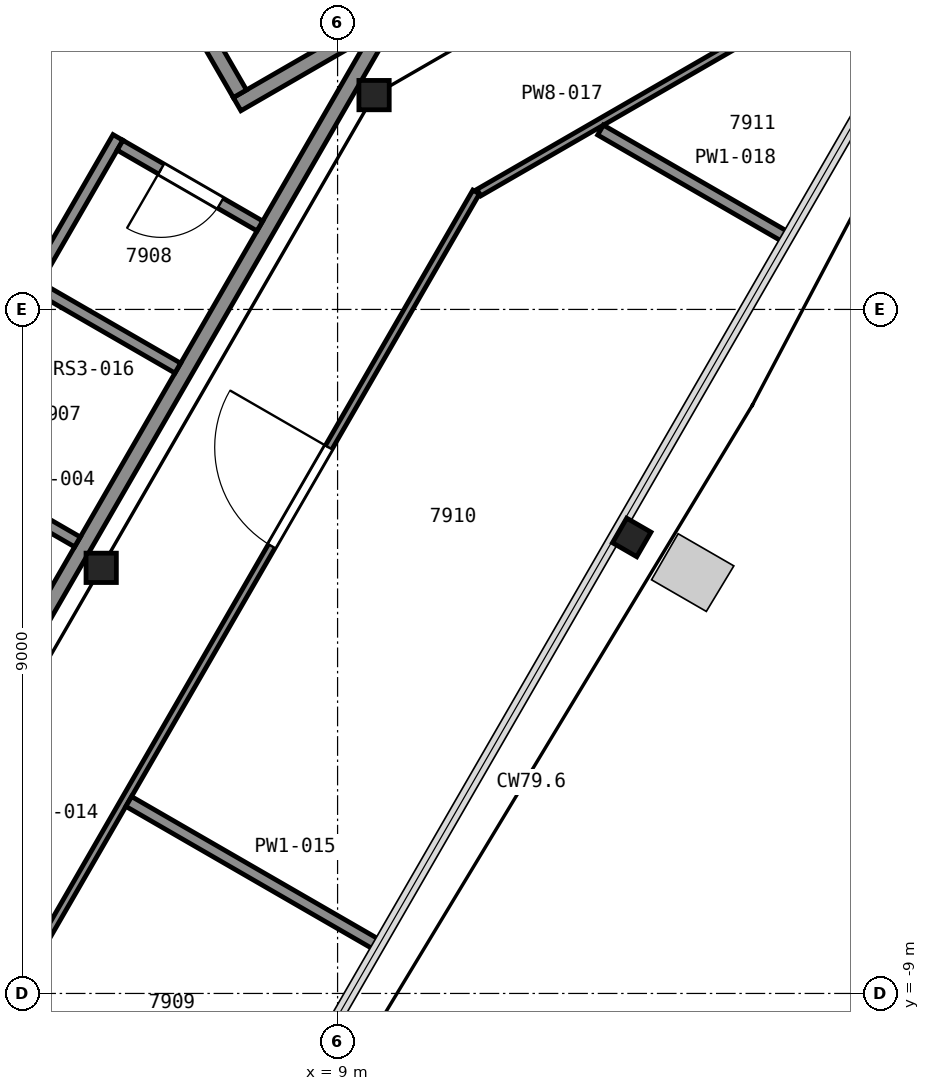
"""IFC4 building model, lengths in metres.
Left out: names, types, materials, properties, quantities, classifications, styles, units other than length and angle.
Written with IfcOpenShell. Run it as: python <this file> out.ifc"""

import sys

from ifc_helpers import new_model, si_unit, direction, frame, frame_2d, origin, origin_2d, place, context, subcontext, project, spatial, rectangle, i_section, extrude, element, fill, save


model = new_model("IFC4")
c1 = context("Model", 3, precision=1e-05, world=origin(), true_north=direction((0.0, 1.0)))
c2 = subcontext(c1, "Body", "Model", "MODEL_VIEW")
j1 = project(units=[si_unit("LENGTHUNIT", "METRE"), si_unit("PLANEANGLEUNIT", "RADIAN")], contexts=[c1])
p1 = place(None, origin())
s1 = spatial("IfcSite", under=j1, at=p1, CompositionType="ELEMENT")
p2 = place(p1, origin())
s2 = spatial("IfcBuilding", under=s1, at=p2, CompositionType="ELEMENT")
p3 = place(p2, frame((0.0, 0.0, 312.6)))
s3 = spatial("IfcBuildingStorey", under=s2, at=p3, CompositionType="ELEMENT", Elevation=312.6)
p4 = place(p3, frame((12.87, -3.0, 0.0), z_axis=(0.0, 0.0, 1.0), x_axis=(-0.5, -0.866025403784, 0.0)))
e1 = element("IfcColumn", 1, at=p4, inside=s3, PredefinedType="COLUMN", context=c2, shape_type="SweptSolid", body=[
    extrude(i_section(OverallWidth=0.373, OverallDepth=0.368, WebThickness=0.015, FlangeThickness=0.024, FilletRadius=0.015, at=origin_2d()), origin(), (0.0, 0.0, 1.0), 4.2),
])
for number, where, z_axis, x_axis in (
    (2, (9.48, 2.82, 0.0), (0.0, 0.0, 1.0), (1.0, 0.0, 0.0)),
    (3, (5.89, -3.4, 0.0), (0.0, 0.0, 1.0), (1.0, 0.0, 0.0)),
):
    element("IfcColumn", number, at=place(p3, frame(where, z_axis=z_axis, x_axis=x_axis)), inside=s3, PredefinedType="COLUMN", context=c2, shape_type="SweptSolid", body=[
        extrude(i_section(OverallWidth=0.399, OverallDepth=0.386, WebThickness=0.021, FlangeThickness=0.033, FilletRadius=0.015, at=origin_2d()), origin(), (0.0, 0.0, 1.0), 4.2),
    ])
p5 = place(p3, frame((7.678, 2.701, 0.0), z_axis=(0.0, 0.0, 1.0), x_axis=(0.866018442252, 0.500012057535, 0.0)))
e4 = element("IfcWall", 4, at=p5, inside=s3, PredefinedType="PARTITIONING", context=c2, shape_type="SweptSolid", body=[
    extrude(rectangle(XDim=7.2, YDim=0.2, at=frame_2d((3.6, 0.0))), origin(), (0.0, 0.0, 1.0), 3.95),
])
p6 = place(p3, frame((7.715, 2.838, 0.0), z_axis=(0.0, 0.0, 1.0), x_axis=(-0.500049511043, 0.865996816683, 0.0)))
e5 = element("IfcWall", 5, at=p6, inside=s3, PredefinedType="PARTITIONING", context=c2, shape_type="SweptSolid", body=[
    extrude(rectangle(XDim=2.8, YDim=0.2, at=frame_2d((1.4, 0.0))), origin(), (0.0, 0.0, 1.0), 3.95),
])
p7 = place(p3, frame((2.552, -8.5, 0.0), z_axis=(0.0, 0.0, 1.0), x_axis=(0.499981156672, 0.866036282712, 0.0)))
e6 = element("IfcWall", 6, at=p7, inside=s3, PredefinedType="PARTITIONING", context=c2, shape_type="SweptSolid", body=[
    extrude(rectangle(XDim=13.915, YDim=0.2, at=frame_2d((6.957, 0.0))), origin(), (0.0, 0.0, 1.0), 3.95),
])
p8 = place(p3, frame((3.738, -1.997, 0.0), z_axis=(0.0, 0.0, 1.0), x_axis=(0.865913749133, -0.500193341681, 0.0)))
e7 = element("IfcWall", 7, at=p8, inside=s3, PredefinedType="PARTITIONING", context=c2, shape_type="SweptSolid", body=[
    extrude(rectangle(XDim=2.124, YDim=0.15, at=frame_2d((1.062, 0.0))), origin(), (0.0, 0.0, 1.0), 3.95),
])
p9 = place(p3, frame((6.111, 2.263, 0.0), z_axis=(0.0, 0.0, 1.0), x_axis=(-0.500011342071, -0.866018855338, 0.0)))
e8 = element("IfcWall", 8, at=p9, inside=s3, PredefinedType="PARTITIONING", context=c2, shape_type="SweptSolid", body=[
    extrude(rectangle(XDim=4.95, YDim=0.15, at=frame_2d((2.475, 0.0))), origin(), (0.0, 0.0, 1.0), 3.95),
])
p10 = place(p9, frame((3.275, 0.0, 0.0)))
e9 = element("IfcOpeningElement", 9, at=p10, cuts=e8, PredefinedType="OPENING", context=c2, shape_type="SweptSolid", body=[
    extrude(rectangle(XDim=0.9, YDim=2.1, at=frame_2d((0.45, 1.05))), frame((0.0, 0.085, 0.0), z_axis=(0.0, -1.0, 0.0), x_axis=(1.0, 0.0, 0.0)), (0.0, 0.0, 1.0), 0.17),
])
p11 = place(p3, frame((5.058, 0.29, 0.0), z_axis=(0.0, 0.0, 1.0), x_axis=(0.866141567767, -0.499798744081, 0.0)))
e10 = element("IfcWall", 10, at=p11, inside=s3, PredefinedType="PARTITIONING", context=c2, shape_type="SweptSolid", body=[
    extrude(rectangle(XDim=2.124, YDim=0.15, at=frame_2d((1.062, 0.0))), origin(), (0.0, 0.0, 1.0), 3.95),
])
p12 = place(p3, frame((7.977, 1.098, 0.0), z_axis=(0.0, 0.0, 1.0), x_axis=(-0.865913749133, 0.500193341681, 0.0)))
e11 = element("IfcWall", 11, at=p12, inside=s3, PredefinedType="PARTITIONING", context=c2, shape_type="SweptSolid", body=[
    extrude(rectangle(XDim=2.124, YDim=0.15, at=frame_2d((1.062, 0.0))), origin(), (0.0, 0.0, 1.0), 3.95),
])
p13 = place(p12, frame((0.599, 0.0, 0.0)))
e12 = element("IfcOpeningElement", 12, at=p13, cuts=e11, PredefinedType="OPENING", context=c2, shape_type="SweptSolid", body=[
    extrude(rectangle(XDim=0.9, YDim=2.1, at=frame_2d((0.45, 1.05))), frame((0.0, 0.085, 0.0), z_axis=(0.0, -1.0, 0.0), x_axis=(1.0, 0.0, 0.0)), (0.0, 0.0, 1.0), 0.17),
])
p14 = place(p3, frame((10.823, 1.545, 0.0), z_axis=(0.0, 0.0, 1.0), x_axis=(-0.499912942625, -0.866075660549, 0.0)))
e13 = element("IfcWall", 13, at=p14, inside=s3, PredefinedType="PARTITIONING", context=c2, shape_type="SweptSolid", body=[
    extrude(rectangle(XDim=13.499, YDim=0.1, at=frame_2d((6.749, 0.0))), origin(), (0.0, 0.0, 1.0), 3.297),
])
p15 = place(p14, frame((3.88, 0.0, 0.0)))
e14 = element("IfcOpeningElement", 14, at=p15, cuts=e13, PredefinedType="OPENING", context=c2, shape_type="SweptSolid", body=[
    extrude(rectangle(XDim=1.5, YDim=2.1, at=frame_2d((0.75, 1.05))), frame((0.0, 0.06, 0.0), z_axis=(0.0, -1.0, 0.0), x_axis=(1.0, 0.0, 0.0)), (0.0, 0.0, 1.0), 0.12),
])
p16 = place(p3, frame((6.252, -6.474, 0.0), z_axis=(0.0, 0.0, 1.0), x_axis=(0.866085610259, -0.499895704825, 0.0)))
e15 = element("IfcWall", 15, at=p16, inside=s3, PredefinedType="PARTITIONING", context=c2, shape_type="SweptSolid", body=[
    extrude(rectangle(XDim=3.781, YDim=0.15, at=frame_2d((1.891, 0.0))), origin(), (0.0, 0.0, 1.0), 3.297),
])
p17 = place(p3, frame((17.361, 5.29, 0.0), z_axis=(0.0, 0.0, 1.0), x_axis=(-0.866105995393, -0.499860385252, 0.0)))
e16 = element("IfcWall", 16, at=p17, inside=s3, PredefinedType="PARTITIONING", context=c2, shape_type="SweptSolid", body=[
    extrude(rectangle(XDim=7.508, YDim=0.1, at=frame_2d((3.754, 0.0))), origin(), (0.0, 0.0, 1.0), 3.297),
])
p18 = place(p17, frame((2.21, 0.0, 0.0)))
e17 = element("IfcOpeningElement", 17, at=p18, cuts=e16, PredefinedType="OPENING", context=c2, shape_type="SweptSolid", body=[
    extrude(rectangle(XDim=1.5, YDim=2.1, at=frame_2d((0.75, 1.05))), frame((0.0, 0.06, 0.0), z_axis=(0.0, -1.0, 0.0), x_axis=(1.0, 0.0, 0.0)), (0.0, 0.0, 1.0), 0.12),
])
p19 = place(p3, frame((12.459, 2.36, 0.0), z_axis=(0.0, 0.0, 1.0), x_axis=(0.865988260476, -0.50006432858, 0.0)))
e18 = element("IfcWall", 18, at=p19, inside=s3, PredefinedType="PARTITIONING", context=c2, shape_type="SweptSolid", body=[
    extrude(rectangle(XDim=2.823, YDim=0.15, at=frame_2d((1.412, 0.0))), origin(), (0.0, 0.0, 1.0), 3.297),
])
p20 = place(p13, origin())
e19 = element("IfcDoor", 19, at=p20, inside=s3, OperationType="SINGLE_SWING_RIGHT", PredefinedType="DOOR", context=c2, shape_type="SweptSolid", body=[
    extrude(rectangle(XDim=0.9, YDim=2.1, at=frame_2d((0.45, 1.05))), frame((0.0, 0.025, 0.0), z_axis=(0.0, -1.0, 0.0), x_axis=(1.0, 0.0, 0.0)), (0.0, 0.0, 1.0), 0.05),
])
fill(e12, e19)
p21 = place(p15, origin())
e20 = element("IfcDoor", 20, at=p21, inside=s3, OperationType="DOUBLE_DOOR_SINGLE_SWING", PredefinedType="DOOR", context=c2, shape_type="SweptSolid", body=[
    extrude(rectangle(XDim=1.5, YDim=2.1, at=frame_2d((0.75, 1.05))), frame((0.0, 0.025, 0.0), z_axis=(0.0, -1.0, 0.0), x_axis=(1.0, 0.0, 0.0)), (0.0, 0.0, 1.0), 0.05),
])
fill(e14, e20)
save(model, sys.argv[1])
